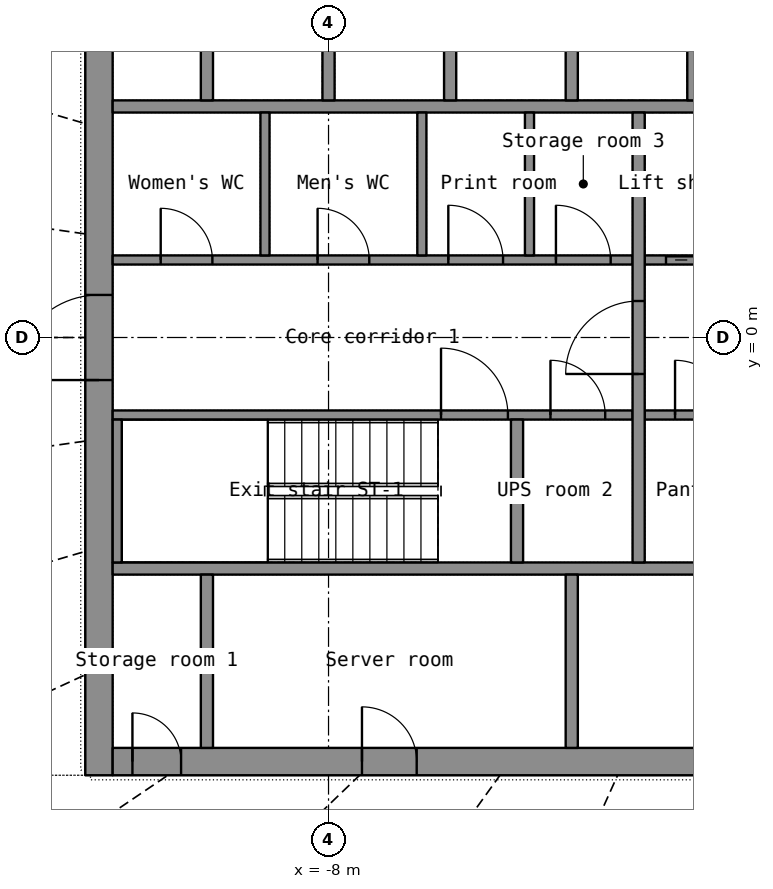
"""IFC4 building model, lengths in metres.
Left out: names, types, materials, properties, quantities, classifications, styles, units other than length and angle.
Written with IfcOpenShell. Run it as: python <this file> out.ifc"""

import sys

from ifc_helpers import new_model, si_unit, direction, frame, frame_2d, origin, place, context, subcontext, project, spatial, rectangle, extrude, element, fill, save


model = new_model("IFC4")
c1 = context("Model", 3, precision=1e-05, world=origin(), true_north=direction((0.0, 1.0)))
c2 = subcontext(c1, "Body", "Model", "MODEL_VIEW")
j1 = project(units=[si_unit("LENGTHUNIT", "METRE"), si_unit("PLANEANGLEUNIT", "RADIAN")], contexts=[c1])
p1 = place(None, origin())
s1 = spatial("IfcSite", under=j1, at=p1, CompositionType="ELEMENT")
p2 = place(p1, origin())
s2 = spatial("IfcBuilding", under=s1, at=p2, CompositionType="ELEMENT")
p3 = place(p2, frame((0.0, 0.0, 171.9)))
s3 = spatial("IfcBuildingStorey", under=s2, at=p3, CompositionType="ELEMENT", Elevation=171.9)
p4 = place(p3, frame((-11.775, -7.2, 0.0), z_axis=(0.0, 0.0, 1.0), x_axis=(0.0, 1.0, 0.0)))
e1 = element("IfcWall", 1, at=p4, inside=s3, PredefinedType="SHEAR", context=c2, shape_type="SweptSolid", body=[
    extrude(rectangle(XDim=14.4, YDim=0.45, at=frame_2d((7.2, 0.0))), origin(), (0.0, 0.0, 1.0), 3.3),
])
p5 = place(p4, frame((6.5, 0.0, 0.0)))
e2 = element("IfcOpeningElement", 2, at=p5, cuts=e1, PredefinedType="OPENING", context=c2, shape_type="SweptSolid", body=[
    extrude(rectangle(XDim=1.4, YDim=2.2, at=frame_2d((0.7, 1.1))), frame((0.0, 0.235, 0.0), z_axis=(0.0, -1.0, 0.0), x_axis=(1.0, 0.0, 0.0)), (0.0, 0.0, 1.0), 0.47),
])
p6 = place(p3, frame((-11.55, -6.975, 0.0), z_axis=(0.0, 0.0, 1.0), x_axis=(1.0, 0.0, 0.0)))
e3 = element("IfcWall", 3, at=p6, inside=s3, PredefinedType="SHEAR", context=c2, shape_type="SweptSolid", body=[
    extrude(rectangle(XDim=23.1, YDim=0.45, at=frame_2d((11.55, 0.0))), origin(), (0.0, 0.0, 1.0), 3.3),
])
p7 = place(p6, frame((20.0, 0.0, 0.0)))
e4 = element("IfcOpeningElement", 4, at=p7, cuts=e3, PredefinedType="OPENING", context=c2, shape_type="SweptSolid", body=[
    extrude(rectangle(XDim=1.1, YDim=2.2, at=frame_2d((0.55, 1.1))), frame((0.0, 0.235, 0.0), z_axis=(0.0, -1.0, 0.0), x_axis=(1.0, 0.0, 0.0)), (0.0, 0.0, 1.0), 0.47),
])
p8 = place(p6, frame((4.1, 0.0, 0.0)))
e5 = element("IfcOpeningElement", 5, at=p8, cuts=e3, PredefinedType="OPENING", context=c2, shape_type="SweptSolid", body=[
    extrude(rectangle(XDim=0.9, YDim=2.1, at=frame_2d((0.45, 1.05))), frame((0.0, 0.235, 0.0), z_axis=(0.0, -1.0, 0.0), x_axis=(1.0, 0.0, 0.0)), (0.0, 0.0, 1.0), 0.47),
])
p9 = place(p6, frame((11.1, 0.0, 0.0)))
e6 = element("IfcOpeningElement", 6, at=p9, cuts=e3, PredefinedType="OPENING", context=c2, shape_type="SweptSolid", body=[
    extrude(rectangle(XDim=0.9, YDim=2.1, at=frame_2d((0.45, 1.05))), frame((0.0, 0.235, 0.0), z_axis=(0.0, -1.0, 0.0), x_axis=(1.0, 0.0, 0.0)), (0.0, 0.0, 1.0), 0.47),
])
p10 = place(p6, frame((17.1, 0.0, 0.0)))
e7 = element("IfcOpeningElement", 7, at=p10, cuts=e3, PredefinedType="OPENING", context=c2, shape_type="SweptSolid", body=[
    extrude(rectangle(XDim=0.9, YDim=2.1, at=frame_2d((0.45, 1.05))), frame((0.0, 0.235, 0.0), z_axis=(0.0, -1.0, 0.0), x_axis=(1.0, 0.0, 0.0)), (0.0, 0.0, 1.0), 0.47),
])
p11 = place(p6, frame((0.325, 0.0, 0.0)))
e8 = element("IfcOpeningElement", 8, at=p11, cuts=e3, PredefinedType="OPENING", context=c2, shape_type="SweptSolid", body=[
    extrude(rectangle(XDim=0.8, YDim=2.05, at=frame_2d((0.4, 1.025))), frame((0.0, 0.235, 0.0), z_axis=(0.0, -1.0, 0.0), x_axis=(1.0, 0.0, 0.0)), (0.0, 0.0, 1.0), 0.47),
])
p12 = place(p6, frame((21.975, 0.0, 0.0)))
e9 = element("IfcOpeningElement", 9, at=p12, cuts=e3, PredefinedType="OPENING", context=c2, shape_type="SweptSolid", body=[
    extrude(rectangle(XDim=0.8, YDim=2.05, at=frame_2d((0.4, 1.025))), frame((0.0, 0.235, 0.0), z_axis=(0.0, -1.0, 0.0), x_axis=(1.0, 0.0, 0.0)), (0.0, 0.0, 1.0), 0.47),
])
for number, where, z_axis, x_axis in (
    (10, (-11.55, -3.8, 0.0), (0.0, 0.0, 1.0), (1.0, 0.0, 0.0)),
    (11, (-11.55, 3.8, 0.0), (0.0, 0.0, 1.0), (1.0, 0.0, 0.0)),
):
    element("IfcWall", number, at=place(p3, frame(where, z_axis=z_axis, x_axis=x_axis)), inside=s3, PredefinedType="SHEAR", context=c2, shape_type="SweptSolid", body=[
        extrude(rectangle(XDim=23.1, YDim=0.2, at=frame_2d((11.55, 0.0))), origin(), (0.0, 0.0, 1.0), 3.3),
    ])
p13 = place(p3, frame((-10.0, -6.75, 0.0), z_axis=(0.0, 0.0, 1.0), x_axis=(0.0, 1.0, 0.0)))
e12 = element("IfcWall", 12, at=p13, inside=s3, PredefinedType="SHEAR", context=c2, shape_type="SweptSolid", body=[
    extrude(rectangle(XDim=2.85, YDim=0.2, at=frame_2d((1.425, 0.0))), origin(), (0.0, 0.0, 1.0), 3.3),
])
p14 = place(p3, frame((-4.0, -6.75, 0.0), z_axis=(0.0, 0.0, 1.0), x_axis=(0.0, 1.0, 0.0)))
e13 = element("IfcWall", 13, at=p14, inside=s3, PredefinedType="PARTITIONING", context=c2, shape_type="SweptSolid", body=[
    extrude(rectangle(XDim=2.85, YDim=0.2, at=frame_2d((1.425, 0.0))), origin(), (0.0, 0.0, 1.0), 3.3),
])
for number, where, z_axis, x_axis in (
    (14, (-10.0, 3.9, 0.0), (0.0, 0.0, 1.0), (0.0, 1.0, 0.0)),
    (15, (-8.0, 3.9, 0.0), (0.0, 0.0, 1.0), (0.0, 1.0, 0.0)),
    (16, (-6.0, 3.9, 0.0), (0.0, 0.0, 1.0), (0.0, 1.0, 0.0)),
    (17, (-4.0, 3.9, 0.0), (0.0, 0.0, 1.0), (0.0, 1.0, 0.0)),
    (18, (-2.0, 3.9, 0.0), (0.0, 0.0, 1.0), (0.0, 1.0, 0.0)),
):
    element("IfcWall", number, at=place(p3, frame(where, z_axis=z_axis, x_axis=x_axis)), inside=s3, PredefinedType="SHEAR", context=c2, shape_type="SweptSolid", body=[
        extrude(rectangle(XDim=2.85, YDim=0.2, at=frame_2d((1.425, 0.0))), origin(), (0.0, 0.0, 1.0), 3.3),
    ])
p15 = place(p3, frame((-11.55, -1.275, 0.0), z_axis=(0.0, 0.0, 1.0), x_axis=(1.0, 0.0, 0.0)))
e19 = element("IfcWall", 19, at=p15, inside=s3, PredefinedType="SHEAR", context=c2, shape_type="SweptSolid", body=[
    extrude(rectangle(XDim=8.55, YDim=0.15, at=frame_2d((4.275, 0.0))), origin(), (0.0, 0.0, 1.0), 3.3),
])
p16 = place(p15, frame((5.4, 0.0, 0.0)))
e20 = element("IfcOpeningElement", 20, at=p16, cuts=e19, PredefinedType="OPENING", context=c2, shape_type="SweptSolid", body=[
    extrude(rectangle(XDim=1.1, YDim=2.15, at=frame_2d((0.55, 1.075))), frame((0.0, 0.085, 0.0), z_axis=(0.0, -1.0, 0.0), x_axis=(1.0, 0.0, 0.0)), (0.0, 0.0, 1.0), 0.17),
])
p17 = place(p15, frame((7.2, 0.0, 0.0)))
e21 = element("IfcOpeningElement", 21, at=p17, cuts=e19, PredefinedType="OPENING", context=c2, shape_type="SweptSolid", body=[
    extrude(rectangle(XDim=0.9, YDim=2.1, at=frame_2d((0.45, 1.05))), frame((0.0, 0.085, 0.0), z_axis=(0.0, -1.0, 0.0), x_axis=(1.0, 0.0, 0.0)), (0.0, 0.0, 1.0), 0.17),
])
p18 = place(p3, frame((-2.8, -1.275, 0.0), z_axis=(0.0, 0.0, 1.0), x_axis=(1.0, 0.0, 0.0)))
e22 = element("IfcWall", 22, at=p18, inside=s3, PredefinedType="SHEAR", context=c2, shape_type="SweptSolid", body=[
    extrude(rectangle(XDim=5.6, YDim=0.15, at=frame_2d((2.8, 0.0))), origin(), (0.0, 0.0, 1.0), 3.3),
])
p19 = place(p18, frame((4.15, 0.0, 0.0)))
e23 = element("IfcOpeningElement", 23, at=p19, cuts=e22, PredefinedType="OPENING", context=c2, shape_type="SweptSolid", body=[
    extrude(rectangle(XDim=1.1, YDim=2.2, at=frame_2d((0.55, 1.1))), frame((0.0, 0.085, 0.0), z_axis=(0.0, -1.0, 0.0), x_axis=(1.0, 0.0, 0.0)), (0.0, 0.0, 1.0), 0.17),
])
p20 = place(p18, frame((0.499, 0.0, 0.0)))
e24 = element("IfcOpeningElement", 24, at=p20, cuts=e22, PredefinedType="OPENING", context=c2, shape_type="SweptSolid", body=[
    extrude(rectangle(XDim=0.9, YDim=2.1, at=frame_2d((0.45, 1.05))), frame((0.0, 0.085, 0.0), z_axis=(0.0, -1.0, 0.0), x_axis=(1.0, 0.0, 0.0)), (0.0, 0.0, 1.0), 0.17),
])
p21 = place(p18, frame((2.374, 0.0, 0.0)))
e25 = element("IfcOpeningElement", 25, at=p21, cuts=e22, PredefinedType="OPENING", context=c2, shape_type="SweptSolid", body=[
    extrude(rectangle(XDim=0.9, YDim=2.1, at=frame_2d((0.45, 1.05))), frame((0.0, 0.085, 0.0), z_axis=(0.0, -1.0, 0.0), x_axis=(1.0, 0.0, 0.0)), (0.0, 0.0, 1.0), 0.17),
])
p22 = place(p3, frame((-11.55, 1.275, 0.0), z_axis=(0.0, 0.0, 1.0), x_axis=(1.0, 0.0, 0.0)))
e26 = element("IfcWall", 26, at=p22, inside=s3, PredefinedType="PARTITIONING", context=c2, shape_type="SweptSolid", body=[
    extrude(rectangle(XDim=8.55, YDim=0.15, at=frame_2d((4.275, 0.0))), origin(), (0.0, 0.0, 1.0), 3.3),
])
p23 = place(p22, frame((0.79, 0.0, 0.0)))
e27 = element("IfcOpeningElement", 27, at=p23, cuts=e26, PredefinedType="OPENING", context=c2, shape_type="SweptSolid", body=[
    extrude(rectangle(XDim=0.85, YDim=2.1, at=frame_2d((0.425, 1.05))), frame((0.0, 0.085, 0.0), z_axis=(0.0, -1.0, 0.0), x_axis=(1.0, 0.0, 0.0)), (0.0, 0.0, 1.0), 0.17),
])
p24 = place(p22, frame((3.37, 0.0, 0.0)))
e28 = element("IfcOpeningElement", 28, at=p24, cuts=e26, PredefinedType="OPENING", context=c2, shape_type="SweptSolid", body=[
    extrude(rectangle(XDim=0.85, YDim=2.1, at=frame_2d((0.425, 1.05))), frame((0.0, 0.085, 0.0), z_axis=(0.0, -1.0, 0.0), x_axis=(1.0, 0.0, 0.0)), (0.0, 0.0, 1.0), 0.17),
])
p25 = place(p22, frame((5.52, 0.0, 0.0)))
e29 = element("IfcOpeningElement", 29, at=p25, cuts=e26, PredefinedType="OPENING", context=c2, shape_type="SweptSolid", body=[
    extrude(rectangle(XDim=0.9, YDim=2.1, at=frame_2d((0.45, 1.05))), frame((0.0, 0.085, 0.0), z_axis=(0.0, -1.0, 0.0), x_axis=(1.0, 0.0, 0.0)), (0.0, 0.0, 1.0), 0.17),
])
p26 = place(p22, frame((7.29, 0.0, 0.0)))
e30 = element("IfcOpeningElement", 30, at=p26, cuts=e26, PredefinedType="OPENING", context=c2, shape_type="SweptSolid", body=[
    extrude(rectangle(XDim=0.9, YDim=2.1, at=frame_2d((0.45, 1.05))), frame((0.0, 0.085, 0.0), z_axis=(0.0, -1.0, 0.0), x_axis=(1.0, 0.0, 0.0)), (0.0, 0.0, 1.0), 0.17),
])
p27 = place(p3, frame((-2.8, 1.275, 0.0), z_axis=(0.0, 0.0, 1.0), x_axis=(1.0, 0.0, 0.0)))
e31 = element("IfcWall", 31, at=p27, inside=s3, PredefinedType="SHEAR", context=c2, shape_type="SweptSolid", body=[
    extrude(rectangle(XDim=5.6, YDim=0.15, at=frame_2d((2.8, 0.0))), origin(), (0.0, 0.0, 1.0), 3.3),
])
p28 = place(p27, frame((0.35, 0.0, 0.0)))
e32 = element("IfcOpeningElement", 32, at=p28, cuts=e31, PredefinedType="OPENING", context=c2, shape_type="SweptSolid", body=[
    extrude(rectangle(XDim=1.1, YDim=2.2, at=frame_2d((0.55, 1.1))), frame((0.0, 0.085, 0.0), z_axis=(0.0, -1.0, 0.0), x_axis=(1.0, 0.0, 0.0)), (0.0, 0.0, 1.0), 0.17),
])
p29 = place(p27, frame((2.413, 0.0, 0.0)))
e33 = element("IfcOpeningElement", 33, at=p29, cuts=e31, PredefinedType="OPENING", context=c2, shape_type="SweptSolid", body=[
    extrude(rectangle(XDim=0.9, YDim=2.1, at=frame_2d((0.45, 1.05))), frame((0.0, 0.085, 0.0), z_axis=(0.0, -1.0, 0.0), x_axis=(1.0, 0.0, 0.0)), (0.0, 0.0, 1.0), 0.17),
])
p30 = place(p27, frame((4.288, 0.0, 0.0)))
e34 = element("IfcOpeningElement", 34, at=p30, cuts=e31, PredefinedType="OPENING", context=c2, shape_type="SweptSolid", body=[
    extrude(rectangle(XDim=0.9, YDim=2.1, at=frame_2d((0.45, 1.05))), frame((0.0, 0.085, 0.0), z_axis=(0.0, -1.0, 0.0), x_axis=(1.0, 0.0, 0.0)), (0.0, 0.0, 1.0), 0.17),
])
p31 = place(p3, frame((-2.9, -3.7, 0.0), z_axis=(0.0, 0.0, 1.0), x_axis=(0.0, 1.0, 0.0)))
e35 = element("IfcWall", 35, at=p31, inside=s3, PredefinedType="SHEAR", context=c2, shape_type="SweptSolid", body=[
    extrude(rectangle(XDim=7.4, YDim=0.2, at=frame_2d((3.7, 0.0))), origin(), (0.0, 0.0, 1.0), 3.3),
])
p32 = place(p31, frame((3.1, 0.0, 0.0)))
e36 = element("IfcOpeningElement", 36, at=p32, cuts=e35, PredefinedType="OPENING", context=c2, shape_type="SweptSolid", body=[
    extrude(rectangle(XDim=1.2, YDim=2.2, at=frame_2d((0.6, 1.1))), frame((0.0, 0.11, 0.0), z_axis=(0.0, -1.0, 0.0), x_axis=(1.0, 0.0, 0.0)), (0.0, 0.0, 1.0), 0.22),
])
p33 = place(p3, frame((-11.475, -3.7, 0.0), z_axis=(0.0, 0.0, 1.0), x_axis=(0.0, 1.0, 0.0)))
e37 = element("IfcWall", 37, at=p33, inside=s3, PredefinedType="SHEAR", context=c2, shape_type="SweptSolid", body=[
    extrude(rectangle(XDim=2.35, YDim=0.15, at=frame_2d((1.175, 0.0))), origin(), (0.0, 0.0, 1.0), 3.3),
])
p34 = place(p3, frame((-4.9, -3.7, 0.0), z_axis=(0.0, 0.0, 1.0), x_axis=(0.0, 1.0, 0.0)))
e38 = element("IfcWall", 38, at=p34, inside=s3, PredefinedType="SHEAR", context=c2, shape_type="SweptSolid", body=[
    extrude(rectangle(XDim=2.35, YDim=0.2, at=frame_2d((1.175, 0.0))), origin(), (0.0, 0.0, 1.0), 3.3),
])
for number, where, z_axis, x_axis in (
    (39, (-9.045, 1.35, 0.0), (0.0, 0.0, 1.0), (0.0, 1.0, 0.0)),
    (40, (-6.465, 1.35, 0.0), (0.0, 0.0, 1.0), (0.0, 1.0, 0.0)),
    (41, (-4.695, 1.35, 0.0), (0.0, 0.0, 1.0), (0.0, 1.0, 0.0)),
):
    element("IfcWall", number, at=place(p3, frame(where, z_axis=z_axis, x_axis=x_axis)), inside=s3, PredefinedType="PARTITIONING", context=c2, shape_type="SweptSolid", body=[
        extrude(rectangle(XDim=2.35, YDim=0.15, at=frame_2d((1.175, 0.0))), origin(), (0.0, 0.0, 1.0), 3.3),
    ])
p35 = place(p8, origin())
e42 = element("IfcDoor", 42, at=p35, inside=s3, OperationType="SINGLE_SWING_LEFT", PredefinedType="DOOR", context=c2, shape_type="SweptSolid", body=[
    extrude(rectangle(XDim=0.9, YDim=2.1, at=frame_2d((0.45, 1.05))), frame((0.0, 0.025, 0.0), z_axis=(0.0, -1.0, 0.0), x_axis=(1.0, 0.0, 0.0)), (0.0, 0.0, 1.0), 0.05),
])
fill(e5, e42)
p36 = place(p11, origin())
e43 = element("IfcDoor", 43, at=p36, inside=s3, OperationType="SINGLE_SWING_LEFT", PredefinedType="DOOR", context=c2, shape_type="SweptSolid", body=[
    extrude(rectangle(XDim=0.8, YDim=2.05, at=frame_2d((0.4, 1.025))), frame((0.0, 0.025, 0.0), z_axis=(0.0, -1.0, 0.0), x_axis=(1.0, 0.0, 0.0)), (0.0, 0.0, 1.0), 0.05),
])
fill(e8, e43)
p37 = place(p5, origin())
e44 = element("IfcDoor", 44, at=p37, inside=s3, OperationType="DOUBLE_DOOR_SINGLE_SWING", PredefinedType="DOOR", context=c2, shape_type="SweptSolid", body=[
    extrude(rectangle(XDim=1.4, YDim=2.2, at=frame_2d((0.7, 1.1))), frame((0.0, 0.025, 0.0), z_axis=(0.0, -1.0, 0.0), x_axis=(1.0, 0.0, 0.0)), (0.0, 0.0, 1.0), 0.05),
])
fill(e2, e44)
p38 = place(p32, origin())
e45 = element("IfcDoor", 45, at=p38, inside=s3, OperationType="SINGLE_SWING_LEFT", PredefinedType="DOOR", context=c2, shape_type="SweptSolid", body=[
    extrude(rectangle(XDim=1.2, YDim=2.2, at=frame_2d((0.6, 1.1))), frame((0.0, 0.025, 0.0), z_axis=(0.0, -1.0, 0.0), x_axis=(1.0, 0.0, 0.0)), (0.0, 0.0, 1.0), 0.05),
])
fill(e36, e45)
p39 = place(p28, origin())
e46 = element("IfcDoor", 46, at=p39, inside=s3, OperationType="DOUBLE_DOOR_SLIDING", PredefinedType="DOOR", context=c2, shape_type="SweptSolid", body=[
    extrude(rectangle(XDim=1.1, YDim=2.2, at=frame_2d((0.55, 1.1))), frame((0.0, 0.025, 0.0), z_axis=(0.0, -1.0, 0.0), x_axis=(1.0, 0.0, 0.0)), (0.0, 0.0, 1.0), 0.05),
])
fill(e32, e46)
p40 = place(p16, origin())
e47 = element("IfcDoor", 47, at=p40, inside=s3, OperationType="SINGLE_SWING_LEFT", PredefinedType="DOOR", context=c2, shape_type="SweptSolid", body=[
    extrude(rectangle(XDim=1.1, YDim=2.15, at=frame_2d((0.55, 1.075))), frame((0.0, 0.025, 0.0), z_axis=(0.0, -1.0, 0.0), x_axis=(1.0, 0.0, 0.0)), (0.0, 0.0, 1.0), 0.05),
])
fill(e20, e47)
p41 = place(p23, origin())
e48 = element("IfcDoor", 48, at=p41, inside=s3, OperationType="SINGLE_SWING_LEFT", PredefinedType="DOOR", context=c2, shape_type="SweptSolid", body=[
    extrude(rectangle(XDim=0.85, YDim=2.1, at=frame_2d((0.425, 1.05))), frame((0.0, 0.025, 0.0), z_axis=(0.0, -1.0, 0.0), x_axis=(1.0, 0.0, 0.0)), (0.0, 0.0, 1.0), 0.05),
])
fill(e27, e48)
p42 = place(p24, origin())
e49 = element("IfcDoor", 49, at=p42, inside=s3, OperationType="SINGLE_SWING_LEFT", PredefinedType="DOOR", context=c2, shape_type="SweptSolid", body=[
    extrude(rectangle(XDim=0.85, YDim=2.1, at=frame_2d((0.425, 1.05))), frame((0.0, 0.025, 0.0), z_axis=(0.0, -1.0, 0.0), x_axis=(1.0, 0.0, 0.0)), (0.0, 0.0, 1.0), 0.05),
])
fill(e28, e49)
p43 = place(p25, origin())
e50 = element("IfcDoor", 50, at=p43, inside=s3, OperationType="SINGLE_SWING_LEFT", PredefinedType="DOOR", context=c2, shape_type="SweptSolid", body=[
    extrude(rectangle(XDim=0.9, YDim=2.1, at=frame_2d((0.45, 1.05))), frame((0.0, 0.025, 0.0), z_axis=(0.0, -1.0, 0.0), x_axis=(1.0, 0.0, 0.0)), (0.0, 0.0, 1.0), 0.05),
])
fill(e29, e50)
p44 = place(p26, origin())
e51 = element("IfcDoor", 51, at=p44, inside=s3, OperationType="SINGLE_SWING_LEFT", PredefinedType="DOOR", context=c2, shape_type="SweptSolid", body=[
    extrude(rectangle(XDim=0.9, YDim=2.1, at=frame_2d((0.45, 1.05))), frame((0.0, 0.025, 0.0), z_axis=(0.0, -1.0, 0.0), x_axis=(1.0, 0.0, 0.0)), (0.0, 0.0, 1.0), 0.05),
])
fill(e30, e51)
p45 = place(p20, origin())
e52 = element("IfcDoor", 52, at=p45, inside=s3, OperationType="SINGLE_SWING_LEFT", PredefinedType="DOOR", context=c2, shape_type="SweptSolid", body=[
    extrude(rectangle(XDim=0.9, YDim=2.1, at=frame_2d((0.45, 1.05))), frame((0.0, 0.025, 0.0), z_axis=(0.0, -1.0, 0.0), x_axis=(1.0, 0.0, 0.0)), (0.0, 0.0, 1.0), 0.05),
])
fill(e24, e52)
p46 = place(p17, origin())
e53 = element("IfcDoor", 53, at=p46, inside=s3, OperationType="SINGLE_SWING_LEFT", PredefinedType="DOOR", context=c2, shape_type="SweptSolid", body=[
    extrude(rectangle(XDim=0.9, YDim=2.1, at=frame_2d((0.45, 1.05))), frame((0.0, 0.025, 0.0), z_axis=(0.0, -1.0, 0.0), x_axis=(1.0, 0.0, 0.0)), (0.0, 0.0, 1.0), 0.05),
])
fill(e21, e53)
save(model, sys.argv[1])
